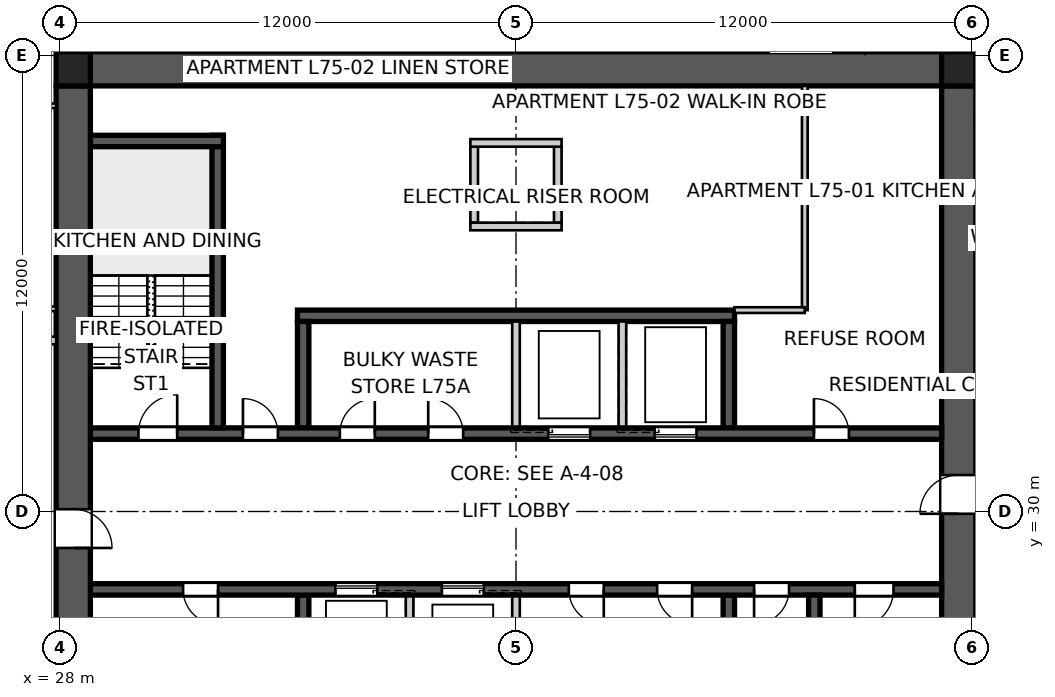
"""IFC4 building model, lengths in metres.
Left out: names, types, materials, properties, quantities, classifications, styles, units other than length and angle.
Written with IfcOpenShell. Run it as: python <this file> out.ifc"""

import sys

from ifc_helpers import new_model, si_unit, direction, frame, frame_2d, origin, origin_2d, place, context, subcontext, project, spatial, polyline, rectangle, outline, extrude, element, fill, save


model = new_model("IFC4")
c1 = context("Model", 3, precision=1e-05, world=origin(), true_north=direction((0.0, 1.0)))
c2 = subcontext(c1, "Body", "Model", "MODEL_VIEW")
j1 = project(units=[si_unit("LENGTHUNIT", "METRE"), si_unit("PLANEANGLEUNIT", "RADIAN")], contexts=[c1])
p1 = place(None, origin())
s1 = spatial("IfcSite", under=j1, at=p1, CompositionType="ELEMENT")
p2 = place(p1, origin())
s2 = spatial("IfcBuilding", under=s1, at=p2, CompositionType="ELEMENT")
p3 = place(p2, frame((0.0, 0.0, 272.6)))
s3 = spatial("IfcBuildingStorey", under=s2, at=p3, CompositionType="ELEMENT", Elevation=272.6)
p4 = place(p3, frame((28.8, 41.65, 0.0), z_axis=(0.0, 0.0, 1.0), x_axis=(1.0, 0.0, 0.0)))
e1 = element("IfcWall", 1, at=p4, inside=s3, PredefinedType="SHEAR", context=c2, shape_type="SweptSolid", body=[
    extrude(outline(polyline([(0.0, -0.45), (22.4, -0.45), (22.4, -0.025), (22.85, -0.025), (22.85, 0.025), (22.4, 0.025), (22.4, 0.45), (0.0, 0.45), (0.0, 0.025), (-0.45, 0.025), (-0.45, -0.025), (0.0, -0.025), (0.0, -0.45)])), origin(), (0.0, 0.0, 1.0), 3.4),
])
p5 = place(p3, frame((51.65, 18.8, 0.0), z_axis=(0.0, 0.0, 1.0), x_axis=(0.0, 1.0, 0.0)))
e2 = element("IfcWall", 2, at=p5, inside=s3, PredefinedType="SHEAR", context=c2, shape_type="SweptSolid", body=[
    extrude(outline(polyline([(0.0, -0.45), (22.4, -0.45), (22.4, -0.025), (22.85, -0.025), (22.85, 0.025), (22.4, 0.025), (22.4, 0.45), (0.0, 0.45), (0.0, 0.025), (-0.45, 0.025), (-0.45, -0.025), (0.0, -0.025), (0.0, -0.45)])), origin(), (0.0, 0.0, 1.0), 3.4),
])
p6 = place(p5, frame((11.14, 0.0, 0.0)))
e3 = element("IfcOpeningElement", 3, at=p6, cuts=e2, PredefinedType="OPENING", context=c2, shape_type="SweptSolid", body=[
    extrude(rectangle(XDim=1.02, YDim=2.4, at=frame_2d((0.51, 1.2))), frame((0.0, 0.46, 0.0), z_axis=(0.0, -1.0, 0.0), x_axis=(1.0, 0.0, 0.0)), (0.0, 0.0, 1.0), 0.92),
])
p7 = place(p3, frame((28.35, 41.2, 0.0), z_axis=(0.0, 0.0, 1.0), x_axis=(0.0, -1.0, 0.0)))
e4 = element("IfcWall", 4, at=p7, inside=s3, PredefinedType="SHEAR", context=c2, shape_type="SweptSolid", body=[
    extrude(outline(polyline([(0.0, -0.45), (22.4, -0.45), (22.4, -0.025), (22.85, -0.025), (22.85, 0.025), (22.4, 0.025), (22.4, 0.45), (0.0, 0.45), (0.0, 0.025), (-0.45, 0.025), (-0.45, -0.025), (0.0, -0.025), (0.0, -0.45)])), origin(), (0.0, 0.0, 1.0), 3.4),
])
p8 = place(p7, frame((11.14, 0.0, 0.0)))
e5 = element("IfcOpeningElement", 5, at=p8, cuts=e4, PredefinedType="OPENING", context=c2, shape_type="SweptSolid", body=[
    extrude(rectangle(XDim=1.02, YDim=2.4, at=frame_2d((0.51, 1.2))), frame((0.0, 0.46, 0.0), z_axis=(0.0, -1.0, 0.0), x_axis=(1.0, 0.0, 0.0)), (0.0, 0.0, 1.0), 0.92),
])
p9 = place(p3, frame((28.8, 32.05, 0.0), z_axis=(0.0, 0.0, 1.0), x_axis=(1.0, 0.0, 0.0)))
e6 = element("IfcWall", 6, at=p9, inside=s3, PredefinedType="SHEAR", context=c2, shape_type="SweptSolid", body=[
    extrude(rectangle(XDim=22.4, YDim=0.3, at=frame_2d((11.2, 0.0))), origin(), (0.0, 0.0, 1.0), 3.4),
])
p10 = place(p9, frame((19.04, 0.0, 0.0)))
e7 = element("IfcOpeningElement", 7, at=p10, cuts=e6, PredefinedType="OPENING", context=c2, shape_type="SweptSolid", body=[
    extrude(rectangle(XDim=0.92, YDim=2.1, at=frame_2d((0.46, 1.05))), frame((0.0, 0.16, 0.0), z_axis=(0.0, -1.0, 0.0), x_axis=(1.0, 0.0, 0.0)), (0.0, 0.0, 1.0), 0.32),
])
p11 = place(p9, frame((1.265, 0.0, 0.0)))
e8 = element("IfcOpeningElement", 8, at=p11, cuts=e6, PredefinedType="OPENING", context=c2, shape_type="SweptSolid", body=[
    extrude(rectangle(XDim=1.02, YDim=2.1, at=frame_2d((0.51, 1.05))), frame((0.0, 0.16, 0.0), z_axis=(0.0, -1.0, 0.0), x_axis=(1.0, 0.0, 0.0)), (0.0, 0.0, 1.0), 0.32),
])
p12 = place(p9, frame((4.015, 0.0, 0.0)))
e9 = element("IfcOpeningElement", 9, at=p12, cuts=e6, PredefinedType="OPENING", context=c2, shape_type="SweptSolid", body=[
    extrude(rectangle(XDim=0.92, YDim=2.1, at=frame_2d((0.46, 1.05))), frame((0.0, 0.16, 0.0), z_axis=(0.0, -1.0, 0.0), x_axis=(1.0, 0.0, 0.0)), (0.0, 0.0, 1.0), 0.32),
])
p13 = place(p9, frame((6.565, 0.0, 0.0)))
e10 = element("IfcOpeningElement", 10, at=p13, cuts=e6, PredefinedType="OPENING", context=c2, shape_type="SweptSolid", body=[
    extrude(rectangle(XDim=0.92, YDim=2.1, at=frame_2d((0.46, 1.05))), frame((0.0, 0.16, 0.0), z_axis=(0.0, -1.0, 0.0), x_axis=(1.0, 0.0, 0.0)), (0.0, 0.0, 1.0), 0.32),
])
p14 = place(p9, frame((8.89, 0.0, 0.0)))
e11 = element("IfcOpeningElement", 11, at=p14, cuts=e6, PredefinedType="OPENING", context=c2, shape_type="SweptSolid", body=[
    extrude(rectangle(XDim=0.92, YDim=2.1, at=frame_2d((0.46, 1.05))), frame((0.0, 0.16, 0.0), z_axis=(0.0, -1.0, 0.0), x_axis=(1.0, 0.0, 0.0)), (0.0, 0.0, 1.0), 0.32),
])
p15 = place(p9, frame((12.05, 0.0, 0.0)))
e12 = element("IfcOpeningElement", 12, at=p15, cuts=e6, PredefinedType="OPENING", context=c2, shape_type="SweptSolid", body=[
    extrude(rectangle(XDim=1.1, YDim=2.1, at=frame_2d((0.55, 1.05))), frame((0.0, 0.16, 0.0), z_axis=(0.0, -1.0, 0.0), x_axis=(1.0, 0.0, 0.0)), (0.0, 0.0, 1.0), 0.32),
])
p16 = place(p9, frame((14.85, 0.0, 0.0)))
e13 = element("IfcOpeningElement", 13, at=p16, cuts=e6, PredefinedType="OPENING", context=c2, shape_type="SweptSolid", body=[
    extrude(rectangle(XDim=1.1, YDim=2.1, at=frame_2d((0.55, 1.05))), frame((0.0, 0.16, 0.0), z_axis=(0.0, -1.0, 0.0), x_axis=(1.0, 0.0, 0.0)), (0.0, 0.0, 1.0), 0.32),
])
p17 = place(p3, frame((51.2, 27.95, 0.0), z_axis=(0.0, 0.0, 1.0), x_axis=(-1.0, 0.0, 0.0)))
e14 = element("IfcWall", 14, at=p17, inside=s3, PredefinedType="SHEAR", context=c2, shape_type="SweptSolid", body=[
    extrude(rectangle(XDim=22.4, YDim=0.3, at=frame_2d((11.2, 0.0))), origin(), (0.0, 0.0, 1.0), 3.4),
])
p18 = place(p17, frame((19.04, 0.0, 0.0)))
e15 = element("IfcOpeningElement", 15, at=p18, cuts=e14, PredefinedType="OPENING", context=c2, shape_type="SweptSolid", body=[
    extrude(rectangle(XDim=0.92, YDim=2.1, at=frame_2d((0.46, 1.05))), frame((0.0, 0.16, 0.0), z_axis=(0.0, -1.0, 0.0), x_axis=(1.0, 0.0, 0.0)), (0.0, 0.0, 1.0), 0.32),
])
p19 = place(p17, frame((1.265, 0.0, 0.0)))
e16 = element("IfcOpeningElement", 16, at=p19, cuts=e14, PredefinedType="OPENING", context=c2, shape_type="SweptSolid", body=[
    extrude(rectangle(XDim=1.02, YDim=2.1, at=frame_2d((0.51, 1.05))), frame((0.0, 0.16, 0.0), z_axis=(0.0, -1.0, 0.0), x_axis=(1.0, 0.0, 0.0)), (0.0, 0.0, 1.0), 0.32),
])
p20 = place(p17, frame((4.015, 0.0, 0.0)))
e17 = element("IfcOpeningElement", 17, at=p20, cuts=e14, PredefinedType="OPENING", context=c2, shape_type="SweptSolid", body=[
    extrude(rectangle(XDim=0.92, YDim=2.1, at=frame_2d((0.46, 1.05))), frame((0.0, 0.16, 0.0), z_axis=(0.0, -1.0, 0.0), x_axis=(1.0, 0.0, 0.0)), (0.0, 0.0, 1.0), 0.32),
])
p21 = place(p17, frame((8.89, 0.0, 0.0)))
e18 = element("IfcOpeningElement", 18, at=p21, cuts=e14, PredefinedType="OPENING", context=c2, shape_type="SweptSolid", body=[
    extrude(rectangle(XDim=0.92, YDim=2.1, at=frame_2d((0.46, 1.05))), frame((0.0, 0.16, 0.0), z_axis=(0.0, -1.0, 0.0), x_axis=(1.0, 0.0, 0.0)), (0.0, 0.0, 1.0), 0.32),
])
p22 = place(p17, frame((6.565, 0.0, 0.0)))
e19 = element("IfcOpeningElement", 19, at=p22, cuts=e14, PredefinedType="OPENING", context=c2, shape_type="SweptSolid", body=[
    extrude(rectangle(XDim=0.92, YDim=2.1, at=frame_2d((0.46, 1.05))), frame((0.0, 0.16, 0.0), z_axis=(0.0, -1.0, 0.0), x_axis=(1.0, 0.0, 0.0)), (0.0, 0.0, 1.0), 0.32),
])
p23 = place(p17, frame((12.05, 0.0, 0.0)))
e20 = element("IfcOpeningElement", 20, at=p23, cuts=e14, PredefinedType="OPENING", context=c2, shape_type="SweptSolid", body=[
    extrude(rectangle(XDim=1.1, YDim=2.1, at=frame_2d((0.55, 1.05))), frame((0.0, 0.16, 0.0), z_axis=(0.0, -1.0, 0.0), x_axis=(1.0, 0.0, 0.0)), (0.0, 0.0, 1.0), 0.32),
])
p24 = place(p17, frame((14.85, 0.0, 0.0)))
e21 = element("IfcOpeningElement", 21, at=p24, cuts=e14, PredefinedType="OPENING", context=c2, shape_type="SweptSolid", body=[
    extrude(rectangle(XDim=1.1, YDim=2.1, at=frame_2d((0.55, 1.05))), frame((0.0, 0.16, 0.0), z_axis=(0.0, -1.0, 0.0), x_axis=(1.0, 0.0, 0.0)), (0.0, 0.0, 1.0), 0.32),
])
p25 = place(p3, frame((34.25, 35.15, 0.0), z_axis=(0.0, 0.0, 1.0), x_axis=(1.0, 0.0, 0.0)))
e22 = element("IfcWall", 22, at=p25, inside=s3, PredefinedType="SHEAR", context=c2, shape_type="SweptSolid", body=[
    extrude(rectangle(XDim=11.5, YDim=0.3, at=frame_2d((5.75, 0.0))), origin(), (0.0, 0.0, 1.0), 3.4),
])
for number, where, z_axis, x_axis in (
    (23, (34.4, 32.2, 0.0), (0.0, 0.0, 1.0), (0.0, 1.0, 0.0)),
    (24, (45.6, 27.8, 0.0), (0.0, 0.0, 1.0), (0.0, -1.0, 0.0)),
):
    element("IfcWall", number, at=place(p3, frame(where, z_axis=z_axis, x_axis=x_axis)), inside=s3, PredefinedType="SHEAR", context=c2, shape_type="SweptSolid", body=[
        extrude(rectangle(XDim=2.8, YDim=0.3, at=frame_2d((1.4, 0.0))), origin(), (0.0, 0.0, 1.0), 3.4),
    ])
for number, where, z_axis, x_axis in (
    (25, (40.0, 32.2, 0.0), (0.0, 0.0, 1.0), (0.0, 1.0, 0.0)),
    (26, (40.0, 27.8, 0.0), (0.0, 0.0, 1.0), (0.0, -1.0, 0.0)),
    (27, (42.8, 32.2, 0.0), (0.0, 0.0, 1.0), (0.0, 1.0, 0.0)),
    (28, (37.2, 27.8, 0.0), (0.0, 0.0, 1.0), (0.0, -1.0, 0.0)),
):
    element("IfcWall", number, at=place(p3, frame(where, z_axis=z_axis, x_axis=x_axis)), inside=s3, PredefinedType="SOLIDWALL", context=c2, shape_type="SweptSolid", body=[
        extrude(rectangle(XDim=2.8, YDim=0.2, at=frame_2d((1.4, 0.0))), origin(), (0.0, 0.0, 1.0), 3.4),
    ])
for number, where, z_axis, x_axis in (
    (29, (45.6, 32.2, 0.0), (0.0, 0.0, 1.0), (0.0, 1.0, 0.0)),
    (30, (34.4, 27.8, 0.0), (0.0, 0.0, 1.0), (0.0, -1.0, 0.0)),
):
    element("IfcWall", number, at=place(p3, frame(where, z_axis=z_axis, x_axis=x_axis)), inside=s3, PredefinedType="SHEAR", context=c2, shape_type="SweptSolid", body=[
        extrude(rectangle(XDim=2.8, YDim=0.3, at=frame_2d((1.4, 0.0))), origin(), (0.0, 0.0, 1.0), 3.4),
    ])
p26 = place(p3, frame((32.15, 32.2, 0.0), z_axis=(0.0, 0.0, 1.0), x_axis=(0.0, 1.0, 0.0)))
e31 = element("IfcWall", 31, at=p26, inside=s3, PredefinedType="SHEAR", context=c2, shape_type="SweptSolid", body=[
    extrude(rectangle(XDim=7.7, YDim=0.3, at=frame_2d((3.85, 0.0))), origin(), (0.0, 0.0, 1.0), 3.4),
])
p27 = place(p3, frame((28.8, 39.75, 0.0), z_axis=(0.0, 0.0, 1.0), x_axis=(1.0, 0.0, 0.0)))
e32 = element("IfcWall", 32, at=p27, inside=s3, PredefinedType="SHEAR", context=c2, shape_type="SweptSolid", body=[
    extrude(rectangle(XDim=3.5, YDim=0.3, at=frame_2d((1.75, 0.0))), origin(), (0.0, 0.0, 1.0), 3.4),
])
p28 = place(p3, frame((47.85, 27.8, 0.0), z_axis=(0.0, 0.0, 1.0), x_axis=(0.0, -1.0, 0.0)))
e33 = element("IfcWall", 33, at=p28, inside=s3, PredefinedType="SHEAR", context=c2, shape_type="SweptSolid", body=[
    extrude(rectangle(XDim=7.7, YDim=0.3, at=frame_2d((3.85, 0.0))), origin(), (0.0, 0.0, 1.0), 3.4),
])
for number, where, z_axis, x_axis in (
    (34, (38.9, 37.6, 0.0), (0.0, 0.0, 1.0), (0.0, 1.0, 0.0)),
    (35, (41.1, 37.6, 0.0), (0.0, 0.0, 1.0), (0.0, 1.0, 0.0)),
):
    element("IfcWall", number, at=place(p3, frame(where, z_axis=z_axis, x_axis=x_axis)), inside=s3, PredefinedType="SOLIDWALL", context=c2, shape_type="SweptSolid", body=[
        extrude(rectangle(XDim=2.0, YDim=0.2, at=frame_2d((1.0, 0.0))), origin(), (0.0, 0.0, 1.0), 3.4),
    ])
for number, where, z_axis, x_axis in (
    (36, (38.8, 37.5, 0.0), (0.0, 0.0, 1.0), (1.0, 0.0, 0.0)),
    (37, (38.8, 39.7, 0.0), (0.0, 0.0, 1.0), (1.0, 0.0, 0.0)),
):
    element("IfcWall", number, at=place(p3, frame(where, z_axis=z_axis, x_axis=x_axis)), inside=s3, PredefinedType="SOLIDWALL", context=c2, shape_type="SweptSolid", body=[
        extrude(rectangle(XDim=2.4, YDim=0.2, at=frame_2d((1.2, 0.0))), origin(), (0.0, 0.0, 1.0), 3.4),
    ])
for number, where, z_axis, x_axis in (
    (38, (51.65, 41.65, 0.0), (0.0, 0.0, 1.0), (1.0, 0.0, 0.0)),
    (39, (28.35, 41.65, 0.0), (0.0, 0.0, 1.0), (1.0, 0.0, 0.0)),
):
    element("IfcColumn", number, at=place(p3, frame(where, z_axis=z_axis, x_axis=x_axis)), inside=s3, PredefinedType="COLUMN", context=c2, shape_type="SweptSolid", body=[
        extrude(rectangle(XDim=0.9, YDim=0.9, at=origin_2d()), origin(), (0.0, 0.0, 1.0), 3.4),
    ])
p29 = place(p3, frame((27.9, 34.5, 0.0), z_axis=(0.0, 0.0, 1.0), x_axis=(-1.0, 0.0, 0.0)))
e40 = element("IfcWall", 40, at=p29, inside=s3, PredefinedType="PARTITIONING", context=c2, shape_type="SweptSolid", body=[
    extrude(rectangle(XDim=2.5, YDim=0.2, at=frame_2d((1.25, 0.0))), origin(), (0.0, 0.0, 1.0), 3.25),
])
p30 = place(p3, frame((55.704, 43.177, 0.0), z_axis=(0.0, 0.0, 1.0), x_axis=(-0.76603440109, -0.64279957712, 0.0)))
e41 = element("IfcWall", 41, at=p30, inside=s3, PredefinedType="PARTITIONING", context=c2, shape_type="SweptSolid", body=[
    extrude(rectangle(XDim=4.64, YDim=0.25, at=frame_2d((2.32, 0.0))), origin(), (0.0, 0.0, 1.0), 3.25),
])
p31 = place(p3, frame((47.6, 41.2, 0.0), z_axis=(0.0, 0.0, 1.0), x_axis=(0.0, -1.0, 0.0)))
e42 = element("IfcWall", 42, at=p31, inside=s3, PredefinedType="SOLIDWALL", context=c2, shape_type="SweptSolid", body=[
    extrude(rectangle(XDim=5.9, YDim=0.15, at=frame_2d((2.95, 0.0))), origin(), (0.0, 0.0, 1.0), 3.25),
])
p32 = place(p3, frame((47.6, 35.3, 0.0), z_axis=(0.0, 0.0, 1.0), x_axis=(-1.0, 0.0, 0.0)))
e43 = element("IfcWall", 43, at=p32, inside=s3, PredefinedType="SOLIDWALL", context=c2, shape_type="SweptSolid", body=[
    extrude(rectangle(XDim=1.85, YDim=0.15, at=frame_2d((0.925, 0.0))), origin(), (0.0, 0.0, 1.0), 3.25),
])
p33 = place(p3, frame((23.0, 35.333, 0.0), z_axis=(0.0, 0.0, 1.0), x_axis=(1.0, 0.0, 0.0)))
e44 = element("IfcWall", 44, at=p33, inside=s3, PredefinedType="PARTITIONING", context=c2, shape_type="SweptSolid", body=[
    extrude(rectangle(XDim=4.9, YDim=0.12, at=frame_2d((2.45, 0.0))), origin(), (0.0, 0.0, 1.0), 3.25),
])
p34 = place(p33, frame((1.39, 0.0, 0.0)))
e45 = element("IfcOpeningElement", 45, at=p34, cuts=e44, PredefinedType="OPENING", context=c2, shape_type="SweptSolid", body=[
    extrude(rectangle(XDim=0.92, YDim=2.34, at=frame_2d((0.46, 1.17))), frame((0.0, 0.07, 0.0), z_axis=(0.0, -1.0, 0.0), x_axis=(1.0, 0.0, 0.0)), (0.0, 0.0, 1.0), 0.14),
])
p35 = place(p3, frame((23.0, 40.676, 0.0), z_axis=(0.0, 0.0, 1.0), x_axis=(1.0, 0.0, 0.0)))
e46 = element("IfcWall", 46, at=p35, inside=s3, PredefinedType="PARTITIONING", context=c2, shape_type="SweptSolid", body=[
    extrude(rectangle(XDim=4.9, YDim=0.12, at=frame_2d((2.45, 0.0))), origin(), (0.0, 0.0, 1.0), 3.25),
])
p36 = place(p35, frame((1.99, 0.0, 0.0)))
e47 = element("IfcOpeningElement", 47, at=p36, cuts=e46, PredefinedType="OPENING", context=c2, shape_type="SweptSolid", body=[
    extrude(rectangle(XDim=0.92, YDim=2.1, at=frame_2d((0.46, 1.05))), frame((0.0, 0.07, 0.0), z_axis=(0.0, -1.0, 0.0), x_axis=(1.0, 0.0, 0.0)), (0.0, 0.0, 1.0), 0.14),
])
p37 = place(p3, frame((28.663, 41.18, 0.0), z_axis=(0.0, 0.0, 1.0), x_axis=(0.0, 1.0, 0.0)))
e48 = element("IfcWall", 48, at=p37, inside=s3, PredefinedType="PARTITIONING", context=c2, shape_type="SweptSolid", body=[
    extrude(rectangle(XDim=5.82, YDim=0.12, at=frame_2d((2.91, 0.0))), origin(), (0.0, 0.0, 1.0), 3.25),
])
p38 = place(p37, frame((2.44, 0.0, 0.0)))
e49 = element("IfcOpeningElement", 49, at=p38, cuts=e48, PredefinedType="OPENING", context=c2, shape_type="SweptSolid", body=[
    extrude(rectangle(XDim=0.96, YDim=2.1, at=frame_2d((0.48, 1.05))), frame((0.0, 0.07, 0.0), z_axis=(0.0, -1.0, 0.0), x_axis=(1.0, 0.0, 0.0)), (0.0, 0.0, 1.0), 0.14),
])
p39 = place(p3, frame((49.136, 42.1, 0.0), z_axis=(0.0, 0.0, 1.0), x_axis=(0.766055078255, 0.642774935012, 0.0)))
e50 = element("IfcWall", 50, at=p39, inside=s3, PredefinedType="SOLIDWALL", context=c2, shape_type="SweptSolid", body=[
    extrude(rectangle(XDim=5.684, YDim=0.15, at=frame_2d((2.842, 0.0))), origin(), (0.0, 0.0, 1.0), 3.25),
])
p40 = place(p39, frame((2.402, 0.0, 0.0)))
e51 = element("IfcOpeningElement", 51, at=p40, cuts=e50, PredefinedType="OPENING", context=c2, shape_type="SweptSolid", body=[
    extrude(rectangle(XDim=0.92, YDim=2.1, at=frame_2d((0.46, 1.05))), frame((0.0, 0.085, 0.0), z_axis=(0.0, -1.0, 0.0), x_axis=(1.0, 0.0, 0.0)), (0.0, 0.0, 1.0), 0.17),
])
p41 = place(p10, origin())
e52 = element("IfcDoor", 52, at=p41, inside=s3, OperationType="SINGLE_SWING_LEFT", PredefinedType="DOOR", context=c2, shape_type="SweptSolid", body=[
    extrude(rectangle(XDim=0.92, YDim=2.1, at=frame_2d((0.46, 1.05))), frame((0.0, 0.025, 0.0), z_axis=(0.0, -1.0, 0.0), x_axis=(1.0, 0.0, 0.0)), (0.0, 0.0, 1.0), 0.05),
])
fill(e7, e52)
p42 = place(p18, origin())
e53 = element("IfcDoor", 53, at=p42, inside=s3, OperationType="SINGLE_SWING_LEFT", PredefinedType="DOOR", context=c2, shape_type="SweptSolid", body=[
    extrude(rectangle(XDim=0.92, YDim=2.1, at=frame_2d((0.46, 1.05))), frame((0.0, 0.025, 0.0), z_axis=(0.0, -1.0, 0.0), x_axis=(1.0, 0.0, 0.0)), (0.0, 0.0, 1.0), 0.05),
])
fill(e15, e53)
p43 = place(p19, origin())
e54 = element("IfcDoor", 54, at=p43, inside=s3, OperationType="SINGLE_SWING_RIGHT", PredefinedType="DOOR", context=c2, shape_type="SweptSolid", body=[
    extrude(rectangle(XDim=1.02, YDim=2.1, at=frame_2d((0.51, 1.05))), frame((0.0, 0.025, 0.0), z_axis=(0.0, -1.0, 0.0), x_axis=(1.0, 0.0, 0.0)), (0.0, 0.0, 1.0), 0.05),
])
fill(e16, e54)
p44 = place(p11, origin())
e55 = element("IfcDoor", 55, at=p44, inside=s3, OperationType="SINGLE_SWING_RIGHT", PredefinedType="DOOR", context=c2, shape_type="SweptSolid", body=[
    extrude(rectangle(XDim=1.02, YDim=2.1, at=frame_2d((0.51, 1.05))), frame((0.0, 0.025, 0.0), z_axis=(0.0, -1.0, 0.0), x_axis=(1.0, 0.0, 0.0)), (0.0, 0.0, 1.0), 0.05),
])
fill(e8, e55)
p45 = place(p12, origin())
e56 = element("IfcDoor", 56, at=p45, inside=s3, OperationType="SINGLE_SWING_LEFT", PredefinedType="DOOR", context=c2, shape_type="SweptSolid", body=[
    extrude(rectangle(XDim=0.92, YDim=2.1, at=frame_2d((0.46, 1.05))), frame((0.0, 0.025, 0.0), z_axis=(0.0, -1.0, 0.0), x_axis=(1.0, 0.0, 0.0)), (0.0, 0.0, 1.0), 0.05),
])
fill(e9, e56)
p46 = place(p20, origin())
e57 = element("IfcDoor", 57, at=p46, inside=s3, OperationType="SINGLE_SWING_RIGHT", PredefinedType="DOOR", context=c2, shape_type="SweptSolid", body=[
    extrude(rectangle(XDim=0.92, YDim=2.1, at=frame_2d((0.46, 1.05))), frame((0.0, 0.025, 0.0), z_axis=(0.0, -1.0, 0.0), x_axis=(1.0, 0.0, 0.0)), (0.0, 0.0, 1.0), 0.05),
])
fill(e17, e57)
p47 = place(p13, origin())
e58 = element("IfcDoor", 58, at=p47, inside=s3, OperationType="SINGLE_SWING_RIGHT", PredefinedType="DOOR", context=c2, shape_type="SweptSolid", body=[
    extrude(rectangle(XDim=0.92, YDim=2.1, at=frame_2d((0.46, 1.05))), frame((0.0, 0.025, 0.0), z_axis=(0.0, -1.0, 0.0), x_axis=(1.0, 0.0, 0.0)), (0.0, 0.0, 1.0), 0.05),
])
fill(e10, e58)
p48 = place(p14, origin())
e59 = element("IfcDoor", 59, at=p48, inside=s3, OperationType="SINGLE_SWING_LEFT", PredefinedType="DOOR", context=c2, shape_type="SweptSolid", body=[
    extrude(rectangle(XDim=0.92, YDim=2.1, at=frame_2d((0.46, 1.05))), frame((0.0, 0.025, 0.0), z_axis=(0.0, -1.0, 0.0), x_axis=(1.0, 0.0, 0.0)), (0.0, 0.0, 1.0), 0.05),
])
fill(e11, e59)
p49 = place(p21, origin())
e60 = element("IfcDoor", 60, at=p49, inside=s3, OperationType="SINGLE_SWING_LEFT", PredefinedType="DOOR", context=c2, shape_type="SweptSolid", body=[
    extrude(rectangle(XDim=0.92, YDim=2.1, at=frame_2d((0.46, 1.05))), frame((0.0, 0.025, 0.0), z_axis=(0.0, -1.0, 0.0), x_axis=(1.0, 0.0, 0.0)), (0.0, 0.0, 1.0), 0.05),
])
fill(e18, e60)
p50 = place(p22, origin())
e61 = element("IfcDoor", 61, at=p50, inside=s3, OperationType="SINGLE_SWING_LEFT", PredefinedType="DOOR", context=c2, shape_type="SweptSolid", body=[
    extrude(rectangle(XDim=0.92, YDim=2.1, at=frame_2d((0.46, 1.05))), frame((0.0, 0.025, 0.0), z_axis=(0.0, -1.0, 0.0), x_axis=(1.0, 0.0, 0.0)), (0.0, 0.0, 1.0), 0.05),
])
fill(e19, e61)
p51 = place(p6, origin())
e62 = element("IfcDoor", 62, at=p51, inside=s3, OperationType="SINGLE_SWING_LEFT", PredefinedType="DOOR", context=c2, shape_type="SweptSolid", body=[
    extrude(rectangle(XDim=1.02, YDim=2.4, at=frame_2d((0.51, 1.2))), frame((0.0, 0.025, 0.0), z_axis=(0.0, -1.0, 0.0), x_axis=(1.0, 0.0, 0.0)), (0.0, 0.0, 1.0), 0.05),
])
fill(e3, e62)
p52 = place(p8, origin())
e63 = element("IfcDoor", 63, at=p52, inside=s3, OperationType="SINGLE_SWING_RIGHT", PredefinedType="DOOR", context=c2, shape_type="SweptSolid", body=[
    extrude(rectangle(XDim=1.02, YDim=2.4, at=frame_2d((0.51, 1.2))), frame((0.0, 0.025, 0.0), z_axis=(0.0, -1.0, 0.0), x_axis=(1.0, 0.0, 0.0)), (0.0, 0.0, 1.0), 0.05),
])
fill(e5, e63)
p53 = place(p15, origin())
e64 = element("IfcDoor", 64, at=p53, inside=s3, OperationType="SLIDING_TO_LEFT", PredefinedType="DOOR", context=c2, shape_type="SweptSolid", body=[
    extrude(rectangle(XDim=1.1, YDim=2.1, at=frame_2d((0.55, 1.05))), frame((0.0, 0.025, 0.0), z_axis=(0.0, -1.0, 0.0), x_axis=(1.0, 0.0, 0.0)), (0.0, 0.0, 1.0), 0.05),
])
fill(e12, e64)
p54 = place(p23, origin())
e65 = element("IfcDoor", 65, at=p54, inside=s3, OperationType="SLIDING_TO_LEFT", PredefinedType="DOOR", context=c2, shape_type="SweptSolid", body=[
    extrude(rectangle(XDim=1.1, YDim=2.1, at=frame_2d((0.55, 1.05))), frame((0.0, 0.025, 0.0), z_axis=(0.0, -1.0, 0.0), x_axis=(1.0, 0.0, 0.0)), (0.0, 0.0, 1.0), 0.05),
])
fill(e20, e65)
p55 = place(p16, origin())
e66 = element("IfcDoor", 66, at=p55, inside=s3, OperationType="SLIDING_TO_LEFT", PredefinedType="DOOR", context=c2, shape_type="SweptSolid", body=[
    extrude(rectangle(XDim=1.1, YDim=2.1, at=frame_2d((0.55, 1.05))), frame((0.0, 0.025, 0.0), z_axis=(0.0, -1.0, 0.0), x_axis=(1.0, 0.0, 0.0)), (0.0, 0.0, 1.0), 0.05),
])
fill(e13, e66)
p56 = place(p24, origin())
e67 = element("IfcDoor", 67, at=p56, inside=s3, OperationType="SLIDING_TO_LEFT", PredefinedType="DOOR", context=c2, shape_type="SweptSolid", body=[
    extrude(rectangle(XDim=1.1, YDim=2.1, at=frame_2d((0.55, 1.05))), frame((0.0, 0.025, 0.0), z_axis=(0.0, -1.0, 0.0), x_axis=(1.0, 0.0, 0.0)), (0.0, 0.0, 1.0), 0.05),
])
fill(e21, e67)
save(model, sys.argv[1])
